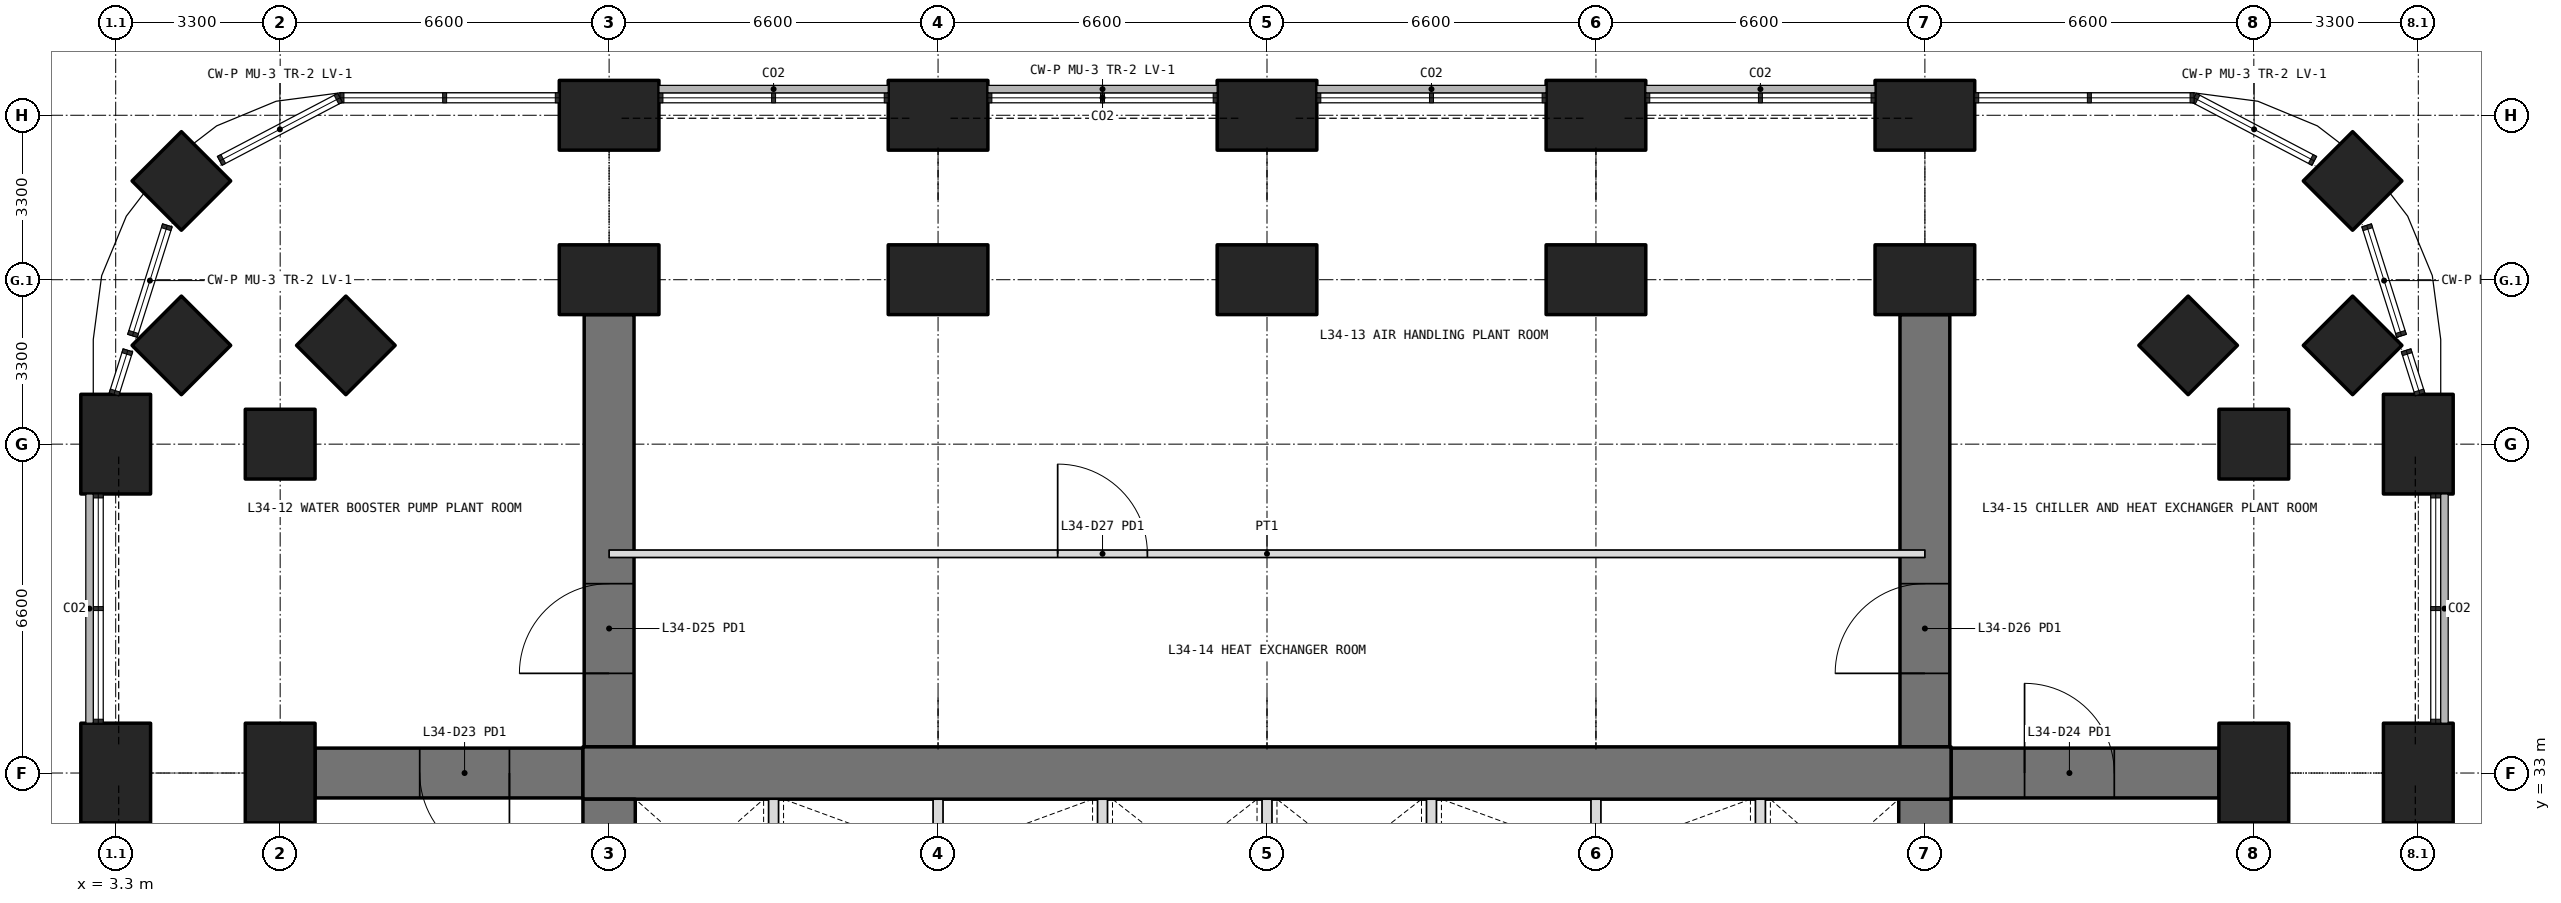
"""IFC4 building model, lengths in metres.
Left out: names, types, materials, properties, quantities, classifications, styles, units other than length and angle.
Written with IfcOpenShell. Run it as: python <this file> out.ifc"""

import sys

from ifc_helpers import new_model, si_unit, direction, frame, frame_2d, origin, origin_2d, place, context, subcontext, project, spatial, rectangle, extrude, element, fill, save


model = new_model("IFC4")
c1 = context("Model", 3, precision=1e-05, world=origin(), true_north=direction((0.0, 1.0)))
c2 = subcontext(c1, "Body", "Model", "MODEL_VIEW")
j1 = project(units=[si_unit("LENGTHUNIT", "METRE"), si_unit("PLANEANGLEUNIT", "RADIAN")], contexts=[c1])
p1 = place(None, origin())
s1 = spatial("IfcSite", under=j1, at=p1, CompositionType="ELEMENT")
p2 = place(p1, origin())
s2 = spatial("IfcBuilding", under=s1, at=p2, CompositionType="ELEMENT")
p3 = place(p2, frame((0.0, 0.0, 149.4)))
s3 = spatial("IfcBuildingStorey", under=s2, at=p3, CompositionType="ELEMENT", Elevation=149.4)
for number, where, z_axis, x_axis in (
    (1, (4.618, 44.882, 0.0), (0.0, 0.0, 1.0), (0.707, 0.707, 0.0)),
    (2, (48.182, 44.882, 0.0), (0.0, 0.0, 1.0), (0.707, 0.707, 0.0)),
):
    element("IfcColumn", number, at=place(p3, frame(where, z_axis=z_axis, x_axis=x_axis)), inside=s3, PredefinedType="COLUMN", context=c2, shape_type="SweptSolid", body=[
        extrude(rectangle(XDim=1.4, YDim=1.4, at=origin_2d()), origin(), (0.0, 0.0, 1.0), 6.3),
    ])
for number, where, z_axis, x_axis in (
    (3, (3.3, 33.0, 0.0), (0.0, 0.0, 1.0), (0.0, 1.0, 0.0)),
    (4, (49.5, 33.0, 0.0), (0.0, 0.0, 1.0), (0.0, 1.0, 0.0)),
    (5, (3.3, 39.6, 0.0), (0.0, 0.0, 1.0), (0.0, 1.0, 0.0)),
    (6, (49.5, 39.6, 0.0), (0.0, 0.0, 1.0), (0.0, 1.0, 0.0)),
    (7, (13.2, 46.2, 0.0), (0.0, 0.0, 1.0), (1.0, 0.0, 0.0)),
    (8, (19.8, 46.2, 0.0), (0.0, 0.0, 1.0), (1.0, 0.0, 0.0)),
    (9, (26.4, 46.2, 0.0), (0.0, 0.0, 1.0), (1.0, 0.0, 0.0)),
    (10, (33.0, 46.2, 0.0), (0.0, 0.0, 1.0), (1.0, 0.0, 0.0)),
    (11, (39.6, 46.2, 0.0), (0.0, 0.0, 1.0), (1.0, 0.0, 0.0)),
):
    element("IfcColumn", number, at=place(p3, frame(where, z_axis=z_axis, x_axis=x_axis)), inside=s3, PredefinedType="COLUMN", context=c2, shape_type="SweptSolid", body=[
        extrude(rectangle(XDim=2.0, YDim=1.4, at=origin_2d()), origin(), (0.0, 0.0, 1.0), 6.3),
    ])
for number, where, z_axis, x_axis in (
    (12, (6.6, 39.6, 0.0), (0.0, 0.0, 1.0), (1.0, 0.0, 0.0)),
    (13, (46.2, 39.6, 0.0), (0.0, 0.0, 1.0), (1.0, 0.0, 0.0)),
    (14, (4.618, 41.582, 0.0), (0.0, 0.0, 1.0), (0.707, 0.707, 0.0)),
    (15, (48.182, 41.582, 0.0), (0.0, 0.0, 1.0), (0.707, 0.707, 0.0)),
):
    element("IfcColumn", number, at=place(p3, frame(where, z_axis=z_axis, x_axis=x_axis)), inside=s3, PredefinedType="COLUMN", context=c2, shape_type="SweptSolid", body=[
        extrude(rectangle(XDim=1.4, YDim=1.4, at=origin_2d()), origin(), (0.0, 0.0, 1.0), 6.3),
    ])
for number, where, z_axis, x_axis in (
    (16, (13.2, 42.9, 0.0), (0.0, 0.0, 1.0), (1.0, 0.0, 0.0)),
    (17, (19.8, 42.9, 0.0), (0.0, 0.0, 1.0), (1.0, 0.0, 0.0)),
    (18, (26.4, 42.9, 0.0), (0.0, 0.0, 1.0), (1.0, 0.0, 0.0)),
    (19, (33.0, 42.9, 0.0), (0.0, 0.0, 1.0), (1.0, 0.0, 0.0)),
    (20, (39.6, 42.9, 0.0), (0.0, 0.0, 1.0), (1.0, 0.0, 0.0)),
):
    element("IfcColumn", number, at=place(p3, frame(where, z_axis=z_axis, x_axis=x_axis)), inside=s3, PredefinedType="COLUMN", context=c2, shape_type="SweptSolid", body=[
        extrude(rectangle(XDim=2.0, YDim=1.4, at=origin_2d()), origin(), (0.0, 0.0, 1.0), 6.3),
    ])
for number, where, z_axis, x_axis in (
    (21, (7.918, 41.582, 0.0), (0.0, 0.0, 1.0), (0.707, 0.707, 0.0)),
    (22, (44.882, 41.582, 0.0), (0.0, 0.0, 1.0), (0.707, 0.707, 0.0)),
):
    element("IfcColumn", number, at=place(p3, frame(where, z_axis=z_axis, x_axis=x_axis)), inside=s3, PredefinedType="COLUMN", context=c2, shape_type="SweptSolid", body=[
        extrude(rectangle(XDim=1.4, YDim=1.4, at=origin_2d()), origin(), (0.0, 0.0, 1.0), 6.3),
    ])
for number, where, z_axis, x_axis in (
    (23, (6.6, 33.0, 0.0), (0.0, 0.0, 1.0), (0.0, 1.0, 0.0)),
    (24, (46.2, 33.0, 0.0), (0.0, 0.0, 1.0), (0.0, 1.0, 0.0)),
):
    element("IfcColumn", number, at=place(p3, frame(where, z_axis=z_axis, x_axis=x_axis)), inside=s3, PredefinedType="COLUMN", context=c2, shape_type="SweptSolid", body=[
        extrude(rectangle(XDim=2.0, YDim=1.4, at=origin_2d()), origin(), (0.0, 0.0, 1.0), 6.3),
    ])
p4 = place(p3, frame((13.2, 33.525, 0.0), z_axis=(0.0, 0.0, 1.0), x_axis=(0.0, 1.0, 0.0)))
e25 = element("IfcWall", 25, at=p4, inside=s3, PredefinedType="SHEAR", context=c2, shape_type="SweptSolid", body=[
    extrude(rectangle(XDim=8.675, YDim=1.0, at=frame_2d((4.337, 0.0))), origin(), (0.0, 0.0, 1.0), 6.0),
])
p5 = place(p4, frame((1.475, 0.0, 0.0)))
e26 = element("IfcOpeningElement", 26, at=p5, cuts=e25, PredefinedType="OPENING", context=c2, shape_type="SweptSolid", body=[
    extrude(rectangle(XDim=1.8, YDim=2.4, at=frame_2d((0.9, 1.2))), frame((0.0, 0.51, 0.0), z_axis=(0.0, -1.0, 0.0), x_axis=(1.0, 0.0, 0.0)), (0.0, 0.0, 1.0), 1.02),
])
p6 = place(p3, frame((39.6, 33.525, 0.0), z_axis=(0.0, 0.0, 1.0), x_axis=(0.0, 1.0, 0.0)))
e27 = element("IfcWall", 27, at=p6, inside=s3, PredefinedType="SHEAR", context=c2, shape_type="SweptSolid", body=[
    extrude(rectangle(XDim=8.675, YDim=1.0, at=frame_2d((4.337, 0.0))), origin(), (0.0, 0.0, 1.0), 6.0),
])
p7 = place(p6, frame((1.475, 0.0, 0.0)))
e28 = element("IfcOpeningElement", 28, at=p7, cuts=e27, PredefinedType="OPENING", context=c2, shape_type="SweptSolid", body=[
    extrude(rectangle(XDim=1.8, YDim=2.4, at=frame_2d((0.9, 1.2))), frame((0.0, 0.51, 0.0), z_axis=(0.0, -1.0, 0.0), x_axis=(1.0, 0.0, 0.0)), (0.0, 0.0, 1.0), 1.02),
])
p8 = place(p3, frame((12.675, 33.0, 0.0), z_axis=(0.0, 0.0, 1.0), x_axis=(-1.0, 0.0, 0.0)))
e29 = element("IfcWall", 29, at=p8, inside=s3, PredefinedType="SHEAR", context=c2, shape_type="SweptSolid", body=[
    extrude(rectangle(XDim=5.375, YDim=1.0, at=frame_2d((2.688, 0.0))), origin(), (0.0, 0.0, 1.0), 6.0),
])
p9 = place(p8, frame((1.475, 0.0, 0.0)))
e30 = element("IfcOpeningElement", 30, at=p9, cuts=e29, PredefinedType="OPENING", context=c2, shape_type="SweptSolid", body=[
    extrude(rectangle(XDim=1.8, YDim=2.4, at=frame_2d((0.9, 1.2))), frame((0.0, 0.51, 0.0), z_axis=(0.0, -1.0, 0.0), x_axis=(1.0, 0.0, 0.0)), (0.0, 0.0, 1.0), 1.02),
])
p10 = place(p3, frame((40.125, 33.0, 0.0), z_axis=(0.0, 0.0, 1.0), x_axis=(1.0, 0.0, 0.0)))
e31 = element("IfcWall", 31, at=p10, inside=s3, PredefinedType="SHEAR", context=c2, shape_type="SweptSolid", body=[
    extrude(rectangle(XDim=5.375, YDim=1.0, at=frame_2d((2.688, 0.0))), origin(), (0.0, 0.0, 1.0), 6.0),
])
p11 = place(p10, frame((1.475, 0.0, 0.0)))
e32 = element("IfcOpeningElement", 32, at=p11, cuts=e31, PredefinedType="OPENING", context=c2, shape_type="SweptSolid", body=[
    extrude(rectangle(XDim=1.8, YDim=2.4, at=frame_2d((0.9, 1.2))), frame((0.0, 0.51, 0.0), z_axis=(0.0, -1.0, 0.0), x_axis=(1.0, 0.0, 0.0)), (0.0, 0.0, 1.0), 1.02),
])
p12 = place(p3, frame((39.6, 13.725, 0.0), z_axis=(0.0, 0.0, 1.0), x_axis=(0.0, 1.0, 0.0)))
e33 = element("IfcWall", 33, at=p12, inside=s3, PredefinedType="SHEAR", context=c2, shape_type="SweptSolid", body=[
    extrude(rectangle(XDim=18.75, YDim=1.05, at=frame_2d((9.375, 0.0))), origin(), (0.0, 0.0, 1.0), 6.3),
])
p13 = place(p12, frame((3.025, 0.0, 0.0)))
e34 = element("IfcOpeningElement", 34, at=p13, cuts=e33, PredefinedType="OPENING", context=c2, shape_type="SweptSolid", body=[
    extrude(rectangle(XDim=1.6, YDim=2.1, at=frame_2d((0.8, 1.05))), frame((0.0, 0.535, 0.0), z_axis=(0.0, -1.0, 0.0), x_axis=(1.0, 0.0, 0.0)), (0.0, 0.0, 1.0), 1.07),
])
p14 = place(p12, frame((13.825, 0.0, 0.0)))
e35 = element("IfcOpeningElement", 35, at=p14, cuts=e33, PredefinedType="OPENING", context=c2, shape_type="SweptSolid", body=[
    extrude(rectangle(XDim=1.6, YDim=2.1, at=frame_2d((0.8, 1.05))), frame((0.0, 0.535, 0.0), z_axis=(0.0, -1.0, 0.0), x_axis=(1.0, 0.0, 0.0)), (0.0, 0.0, 1.0), 1.07),
])
p15 = place(p3, frame((40.125, 33.0, 0.0), z_axis=(0.0, 0.0, 1.0), x_axis=(-1.0, 0.0, 0.0)))
e36 = element("IfcWall", 36, at=p15, inside=s3, PredefinedType="SHEAR", context=c2, shape_type="SweptSolid", body=[
    extrude(rectangle(XDim=27.45, YDim=1.05, at=frame_2d((13.725, 0.0))), origin(), (0.0, 0.0, 1.0), 6.3),
])
p16 = place(p3, frame((13.2, 32.475, 0.0), z_axis=(0.0, 0.0, 1.0), x_axis=(0.0, -1.0, 0.0)))
e37 = element("IfcWall", 37, at=p16, inside=s3, PredefinedType="SHEAR", context=c2, shape_type="SweptSolid", body=[
    extrude(rectangle(XDim=18.75, YDim=1.05, at=frame_2d((9.375, 0.0))), origin(), (0.0, 0.0, 1.0), 6.3),
])
p17 = place(p16, frame((14.125, 0.0, 0.0)))
e38 = element("IfcOpeningElement", 38, at=p17, cuts=e37, PredefinedType="OPENING", context=c2, shape_type="SweptSolid", body=[
    extrude(rectangle(XDim=1.6, YDim=2.1, at=frame_2d((0.8, 1.05))), frame((0.0, 0.535, 0.0), z_axis=(0.0, -1.0, 0.0), x_axis=(1.0, 0.0, 0.0)), (0.0, 0.0, 1.0), 1.07),
])
p18 = place(p16, frame((3.325, 0.0, 0.0)))
e39 = element("IfcOpeningElement", 39, at=p18, cuts=e37, PredefinedType="OPENING", context=c2, shape_type="SweptSolid", body=[
    extrude(rectangle(XDim=1.6, YDim=2.1, at=frame_2d((0.8, 1.05))), frame((0.0, 0.535, 0.0), z_axis=(0.0, -1.0, 0.0), x_axis=(1.0, 0.0, 0.0)), (0.0, 0.0, 1.0), 1.07),
])
for number, where, z_axis, x_axis in (
    (40, (16.5, 30.2, 0.0), (0.0, 0.0, 1.0), (0.0, 1.0, 0.0)),
    (41, (19.8, 30.2, 0.0), (0.0, 0.0, 1.0), (0.0, 1.0, 0.0)),
    (42, (23.1, 30.2, 0.0), (0.0, 0.0, 1.0), (0.0, 1.0, 0.0)),
    (43, (26.4, 30.2, 0.0), (0.0, 0.0, 1.0), (0.0, 1.0, 0.0)),
    (44, (29.7, 30.2, 0.0), (0.0, 0.0, 1.0), (0.0, 1.0, 0.0)),
    (45, (33.0, 30.2, 0.0), (0.0, 0.0, 1.0), (0.0, 1.0, 0.0)),
    (46, (36.3, 30.2, 0.0), (0.0, 0.0, 1.0), (0.0, 1.0, 0.0)),
):
    element("IfcWall", number, at=place(p3, frame(where, z_axis=z_axis, x_axis=x_axis)), inside=s3, PredefinedType="PARTITIONING", context=c2, shape_type="SweptSolid", body=[
        extrude(rectangle(XDim=2.275, YDim=0.2, at=frame_2d((1.138, 0.0))), origin(), (0.0, 0.0, 1.0), 6.3),
    ])
p19 = place(p3, frame((13.2, 37.4, 0.0), z_axis=(0.0, 0.0, 1.0), x_axis=(1.0, 0.0, 0.0)))
e47 = element("IfcWall", 47, at=p19, inside=s3, PredefinedType="PARTITIONING", context=c2, shape_type="SweptSolid", body=[
    extrude(rectangle(XDim=26.4, YDim=0.15, at=frame_2d((13.2, 0.0))), origin(), (0.0, 0.0, 1.0), 4.0),
])
p20 = place(p19, frame((9.0, 0.0, 0.0)))
e48 = element("IfcOpeningElement", 48, at=p20, cuts=e47, PredefinedType="OPENING", context=c2, shape_type="SweptSolid", body=[
    extrude(rectangle(XDim=1.8, YDim=2.4, at=frame_2d((0.9, 1.2))), frame((0.0, 0.085, 0.0), z_axis=(0.0, -1.0, 0.0), x_axis=(1.0, 0.0, 0.0)), (0.0, 0.0, 1.0), 0.17),
])
p21 = place(p20, origin())
e49 = element("IfcDoor", 49, at=p21, inside=s3, OperationType="DOUBLE_DOOR_SINGLE_SWING", PredefinedType="DOOR", context=c2, shape_type="SweptSolid", body=[
    extrude(rectangle(XDim=1.8, YDim=2.4, at=frame_2d((0.9, 1.2))), frame((0.0, 0.025, 0.0), z_axis=(0.0, -1.0, 0.0), x_axis=(1.0, 0.0, 0.0)), (0.0, 0.0, 1.0), 0.05),
])
fill(e48, e49)
p22 = place(p5, origin())
e50 = element("IfcDoor", 50, at=p22, inside=s3, OperationType="DOUBLE_DOOR_SINGLE_SWING", PredefinedType="DOOR", context=c2, shape_type="SweptSolid", body=[
    extrude(rectangle(XDim=1.8, YDim=2.4, at=frame_2d((0.9, 1.2))), frame((0.0, 0.025, 0.0), z_axis=(0.0, -1.0, 0.0), x_axis=(1.0, 0.0, 0.0)), (0.0, 0.0, 1.0), 0.05),
])
fill(e26, e50)
p23 = place(p7, origin())
e51 = element("IfcDoor", 51, at=p23, inside=s3, OperationType="DOUBLE_DOOR_SINGLE_SWING", PredefinedType="DOOR", context=c2, shape_type="SweptSolid", body=[
    extrude(rectangle(XDim=1.8, YDim=2.4, at=frame_2d((0.9, 1.2))), frame((0.0, 0.025, 0.0), z_axis=(0.0, -1.0, 0.0), x_axis=(1.0, 0.0, 0.0)), (0.0, 0.0, 1.0), 0.05),
])
fill(e28, e51)
p24 = place(p9, origin())
e52 = element("IfcDoor", 52, at=p24, inside=s3, OperationType="DOUBLE_DOOR_SINGLE_SWING", PredefinedType="DOOR", context=c2, shape_type="SweptSolid", body=[
    extrude(rectangle(XDim=1.8, YDim=2.4, at=frame_2d((0.9, 1.2))), frame((0.0, 0.025, 0.0), z_axis=(0.0, -1.0, 0.0), x_axis=(1.0, 0.0, 0.0)), (0.0, 0.0, 1.0), 0.05),
])
fill(e30, e52)
p25 = place(p11, origin())
e53 = element("IfcDoor", 53, at=p25, inside=s3, OperationType="DOUBLE_DOOR_SINGLE_SWING", PredefinedType="DOOR", context=c2, shape_type="SweptSolid", body=[
    extrude(rectangle(XDim=1.8, YDim=2.4, at=frame_2d((0.9, 1.2))), frame((0.0, 0.025, 0.0), z_axis=(0.0, -1.0, 0.0), x_axis=(1.0, 0.0, 0.0)), (0.0, 0.0, 1.0), 0.05),
])
fill(e32, e53)
save(model, sys.argv[1])
